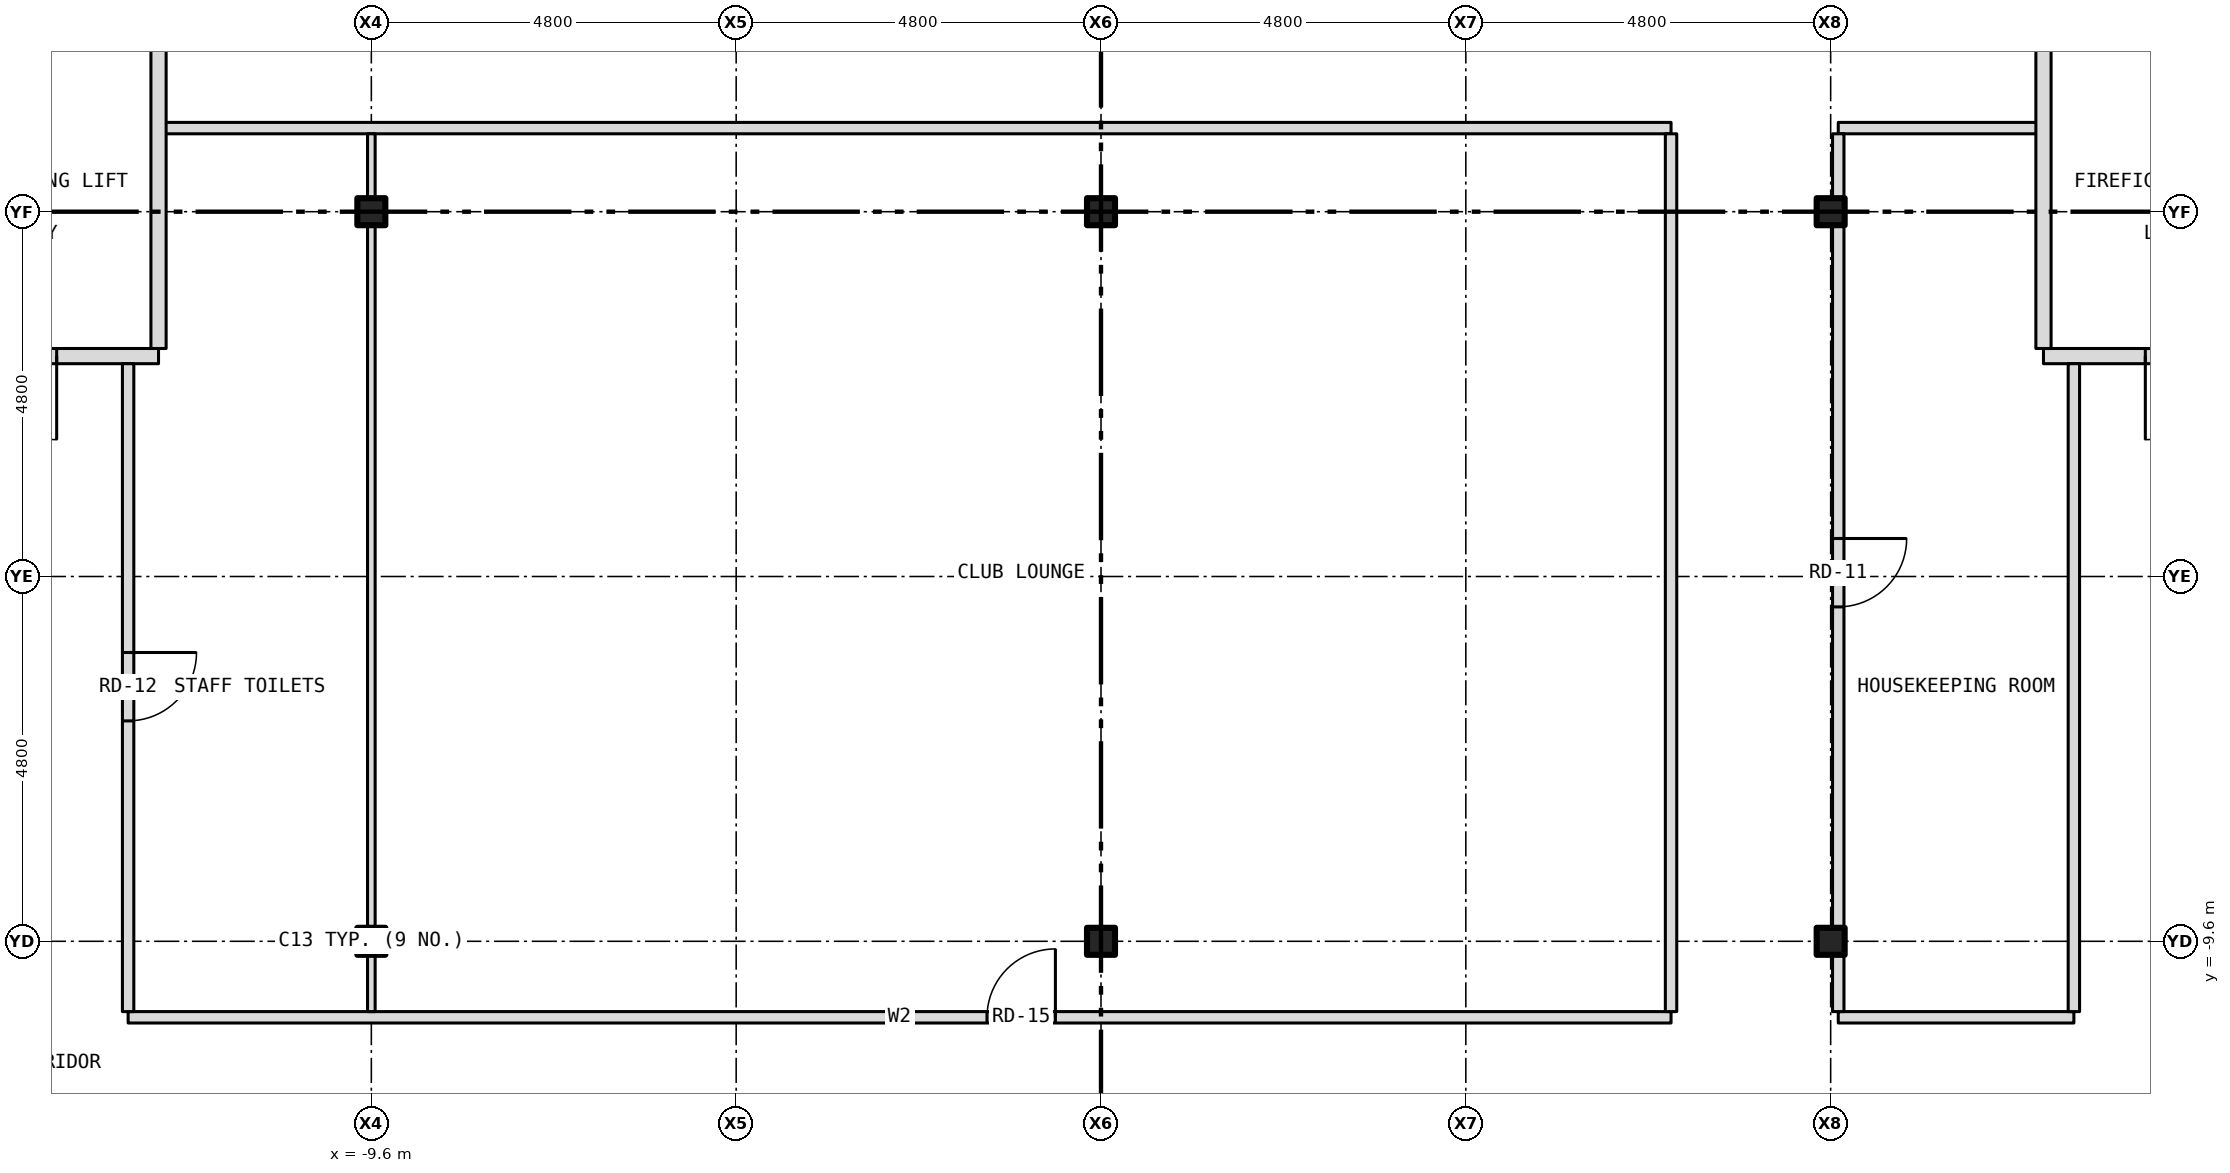
"""IFC4 building model, lengths in metres.
Left out: names, types, materials, properties, quantities, classifications, styles, units other than length and angle.
Written with IfcOpenShell. Run it as: python <this file> out.ifc"""

import sys

from ifc_helpers import new_model, si_unit, direction, frame, frame_2d, origin, origin_2d, place, context, subcontext, project, spatial, rectangle, i_section, extrude, element, fill, save


model = new_model("IFC4")
c1 = context("Model", 3, precision=1e-05, world=origin(), true_north=direction((0.0, 1.0)))
c2 = subcontext(c1, "Body", "Model", "MODEL_VIEW")
j1 = project(units=[si_unit("LENGTHUNIT", "METRE"), si_unit("PLANEANGLEUNIT", "RADIAN")], contexts=[c1])
p1 = place(None, origin())
s1 = spatial("IfcSite", under=j1, at=p1, CompositionType="ELEMENT")
p2 = place(p1, origin())
s2 = spatial("IfcBuilding", under=s1, at=p2, CompositionType="ELEMENT")
p3 = place(p2, frame((0.0, 0.0, 248.0)))
s3 = spatial("IfcBuildingStorey", under=s2, at=p3, CompositionType="ELEMENT", Elevation=248.0)
for number, where, z_axis, x_axis in (
    (1, (-9.6, -9.6, -0.15), (0.0, 0.0, 1.0), (1.0, 0.0, 0.0)),
    (2, (-9.6, 0.0, -0.15), (0.0, 0.0, 1.0), (1.0, 0.0, 0.0)),
    (3, (0.0, -9.6, -0.15), (0.0, 0.0, 1.0), (1.0, 0.0, 0.0)),
    (4, (0.0, 0.0, -0.15), (0.0, 0.0, 1.0), (1.0, 0.0, 0.0)),
    (5, (9.6, -9.6, -0.15), (0.0, 0.0, 1.0), (1.0, 0.0, 0.0)),
    (6, (9.6, 0.0, -0.15), (0.0, 0.0, 1.0), (1.0, 0.0, 0.0)),
):
    element("IfcColumn", number, at=place(p3, frame(where, z_axis=z_axis, x_axis=x_axis)), inside=s3, PredefinedType="COLUMN", context=c2, shape_type="SweptSolid", body=[
        extrude(i_section(OverallWidth=0.368, OverallDepth=0.356, WebThickness=0.011, FlangeThickness=0.018, at=origin_2d()), origin(), (0.0, 0.0, 1.0), 3.5),
    ])
p4 = place(p3, frame((-12.8, -10.6, 0.0), z_axis=(0.0, 0.0, 1.0), x_axis=(1.0, 0.0, 0.0)))
e7 = element("IfcWall", 7, at=p4, inside=s3, PredefinedType="PARTITIONING", context=c2, shape_type="SweptSolid", body=[
    extrude(rectangle(XDim=20.3, YDim=0.15, at=frame_2d((10.15, 0.0))), origin(), (0.0, 0.0, 1.0), 3.35),
])
p5 = place(p4, frame((11.3, 0.0, 0.0)))
e8 = element("IfcOpeningElement", 8, at=p5, cuts=e7, PredefinedType="OPENING", context=c2, shape_type="SweptSolid", body=[
    extrude(rectangle(XDim=0.9, YDim=2.1, at=frame_2d((0.45, 1.05))), frame((0.0, 0.087, 0.0), z_axis=(0.0, -1.0, 0.0), x_axis=(1.0, 0.0, 0.0)), (0.0, 0.0, 1.0), 0.174),
])
p6 = place(p3, frame((9.7, -10.6, 0.0), z_axis=(0.0, 0.0, 1.0), x_axis=(1.0, 0.0, 0.0)))
e9 = element("IfcWall", 9, at=p6, inside=s3, PredefinedType="PARTITIONING", context=c2, shape_type="SweptSolid", body=[
    extrude(rectangle(XDim=3.1, YDim=0.15, at=frame_2d((1.55, 0.0))), origin(), (0.0, 0.0, 1.0), 3.35),
])
p7 = place(p3, frame((-15.68, -1.9, 0.0), z_axis=(0.0, 0.0, 1.0), x_axis=(1.0, 0.0, 0.0)))
e10 = element("IfcWall", 10, at=p7, inside=s3, PredefinedType="PARTITIONING", context=c2, shape_type="SweptSolid", body=[
    extrude(rectangle(XDim=3.28, YDim=0.2, at=frame_2d((1.64, 0.0))), origin(), (0.0, 0.0, 1.0), 3.35),
])
p8 = place(p7, frame((0.84, 0.0, 0.0)))
e11 = element("IfcOpeningElement", 11, at=p8, cuts=e10, PredefinedType="OPENING", context=c2, shape_type="SweptSolid", body=[
    extrude(rectangle(XDim=1.1, YDim=2.1, at=frame_2d((0.55, 1.05))), frame((0.0, 0.112, 0.0), z_axis=(0.0, -1.0, 0.0), x_axis=(1.0, 0.0, 0.0)), (0.0, 0.0, 1.0), 0.224),
])
p9 = place(p3, frame((12.4, -1.9, 0.0), z_axis=(0.0, 0.0, 1.0), x_axis=(1.0, 0.0, 0.0)))
e12 = element("IfcWall", 12, at=p9, inside=s3, PredefinedType="PARTITIONING", context=c2, shape_type="SweptSolid", body=[
    extrude(rectangle(XDim=3.28, YDim=0.2, at=frame_2d((1.64, 0.0))), origin(), (0.0, 0.0, 1.0), 3.35),
])
p10 = place(p9, frame((1.34, 0.0, 0.0)))
e13 = element("IfcOpeningElement", 13, at=p10, cuts=e12, PredefinedType="OPENING", context=c2, shape_type="SweptSolid", body=[
    extrude(rectangle(XDim=1.1, YDim=2.1, at=frame_2d((0.55, 1.05))), frame((0.0, 0.112, 0.0), z_axis=(0.0, -1.0, 0.0), x_axis=(1.0, 0.0, 0.0)), (0.0, 0.0, 1.0), 0.224),
])
p11 = place(p3, frame((-12.4, 1.1, 0.0), z_axis=(0.0, 0.0, 1.0), x_axis=(1.0, 0.0, 0.0)))
e14 = element("IfcWall", 14, at=p11, inside=s3, PredefinedType="PARTITIONING", context=c2, shape_type="SweptSolid", body=[
    extrude(rectangle(XDim=19.9, YDim=0.15, at=frame_2d((9.95, 0.0))), origin(), (0.0, 0.0, 1.0), 3.35),
])
p12 = place(p3, frame((9.7, 1.1, 0.0), z_axis=(0.0, 0.0, 1.0), x_axis=(1.0, 0.0, 0.0)))
e15 = element("IfcWall", 15, at=p12, inside=s3, PredefinedType="PARTITIONING", context=c2, shape_type="SweptSolid", body=[
    extrude(rectangle(XDim=2.7, YDim=0.15, at=frame_2d((1.35, 0.0))), origin(), (0.0, 0.0, 1.0), 3.35),
])
p13 = place(p3, frame((-12.8, -10.525, 0.0), z_axis=(0.0, 0.0, 1.0), x_axis=(0.0, 1.0, 0.0)))
e16 = element("IfcWall", 16, at=p13, inside=s3, PredefinedType="PARTITIONING", context=c2, shape_type="SweptSolid", body=[
    extrude(rectangle(XDim=8.525, YDim=0.15, at=frame_2d((4.262, 0.0))), origin(), (0.0, 0.0, 1.0), 3.35),
])
p14 = place(p13, frame((3.825, 0.0, 0.0)))
e17 = element("IfcOpeningElement", 17, at=p14, cuts=e16, PredefinedType="OPENING", context=c2, shape_type="SweptSolid", body=[
    extrude(rectangle(XDim=0.9, YDim=2.1, at=frame_2d((0.45, 1.05))), frame((0.0, 0.087, 0.0), z_axis=(0.0, -1.0, 0.0), x_axis=(1.0, 0.0, 0.0)), (0.0, 0.0, 1.0), 0.174),
])
p15 = place(p3, frame((-12.4, -1.8, 0.0), z_axis=(0.0, 0.0, 1.0), x_axis=(0.0, 1.0, 0.0)))
e18 = element("IfcWall", 18, at=p15, inside=s3, PredefinedType="PARTITIONING", context=c2, shape_type="SweptSolid", body=[
    extrude(rectangle(XDim=4.0, YDim=0.2, at=frame_2d((2.0, 0.0))), origin(), (0.0, 0.0, 1.0), 3.35),
])
p16 = place(p3, frame((-9.6, -10.525, 0.0), z_axis=(0.0, 0.0, 1.0), x_axis=(0.0, 1.0, 0.0)))
e19 = element("IfcWall", 19, at=p16, inside=s3, PredefinedType="PARTITIONING", context=c2, shape_type="SweptSolid", body=[
    extrude(rectangle(XDim=0.741, YDim=0.1, at=frame_2d((0.371, 0.0))), origin(), (0.0, 0.0, 1.0), 2.728),
])
p17 = place(p3, frame((-9.6, -9.784, 0.0), z_axis=(0.0, 0.0, 1.0), x_axis=(0.0, 1.0, 0.0)))
e20 = element("IfcWall", 20, at=p17, inside=s3, PredefinedType="PARTITIONING", context=c2, shape_type="SweptSolid", body=[
    extrude(rectangle(XDim=0.368, YDim=0.1, at=frame_2d((0.184, 0.0))), origin(), (0.0, 0.0, 1.0), 3.35),
])
p18 = place(p3, frame((-9.6, -9.416, 0.0), z_axis=(0.0, 0.0, 1.0), x_axis=(0.0, 1.0, 0.0)))
e21 = element("IfcWall", 21, at=p18, inside=s3, PredefinedType="PARTITIONING", context=c2, shape_type="SweptSolid", body=[
    extrude(rectangle(XDim=9.232, YDim=0.1, at=frame_2d((4.616, 0.0))), origin(), (0.0, 0.0, 1.0), 2.728),
])
p19 = place(p3, frame((-9.6, -0.184, 0.0), z_axis=(0.0, 0.0, 1.0), x_axis=(0.0, 1.0, 0.0)))
e22 = element("IfcWall", 22, at=p19, inside=s3, PredefinedType="PARTITIONING", context=c2, shape_type="SweptSolid", body=[
    extrude(rectangle(XDim=0.368, YDim=0.1, at=frame_2d((0.184, 0.0))), origin(), (0.0, 0.0, 1.0), 3.35),
])
p20 = place(p3, frame((-9.6, 0.184, 0.0), z_axis=(0.0, 0.0, 1.0), x_axis=(0.0, 1.0, 0.0)))
e23 = element("IfcWall", 23, at=p20, inside=s3, PredefinedType="PARTITIONING", context=c2, shape_type="SweptSolid", body=[
    extrude(rectangle(XDim=0.841, YDim=0.1, at=frame_2d((0.42, 0.0))), origin(), (0.0, 0.0, 1.0), 2.728),
])
p21 = place(p3, frame((7.5, -10.525, 0.0), z_axis=(0.0, 0.0, 1.0), x_axis=(0.0, 1.0, 0.0)))
e24 = element("IfcWall", 24, at=p21, inside=s3, PredefinedType="PARTITIONING", context=c2, shape_type="SweptSolid", body=[
    extrude(rectangle(XDim=11.55, YDim=0.15, at=frame_2d((5.775, 0.0))), origin(), (0.0, 0.0, 1.0), 3.35),
])
p22 = place(p3, frame((9.7, -10.525, 0.0), z_axis=(0.0, 0.0, 1.0), x_axis=(0.0, 1.0, 0.0)))
e25 = element("IfcWall", 25, at=p22, inside=s3, PredefinedType="PARTITIONING", context=c2, shape_type="SweptSolid", body=[
    extrude(rectangle(XDim=0.741, YDim=0.15, at=frame_2d((0.371, 0.0))), origin(), (0.0, 0.0, 1.0), 2.728),
])
p23 = place(p3, frame((9.7, -9.784, 0.0), z_axis=(0.0, 0.0, 1.0), x_axis=(0.0, 1.0, 0.0)))
e26 = element("IfcWall", 26, at=p23, inside=s3, PredefinedType="PARTITIONING", context=c2, shape_type="SweptSolid", body=[
    extrude(rectangle(XDim=0.368, YDim=0.15, at=frame_2d((0.184, 0.0))), origin(), (0.0, 0.0, 1.0), 3.35),
])
p24 = place(p3, frame((9.7, -9.416, 0.0), z_axis=(0.0, 0.0, 1.0), x_axis=(0.0, 1.0, 0.0)))
e27 = element("IfcWall", 27, at=p24, inside=s3, PredefinedType="PARTITIONING", context=c2, shape_type="SweptSolid", body=[
    extrude(rectangle(XDim=9.232, YDim=0.15, at=frame_2d((4.616, 0.0))), origin(), (0.0, 0.0, 1.0), 2.728),
])
p25 = place(p24, frame((4.216, 0.0, 0.0)))
e28 = element("IfcOpeningElement", 28, at=p25, cuts=e27, PredefinedType="OPENING", context=c2, shape_type="SweptSolid", body=[
    extrude(rectangle(XDim=0.9, YDim=2.1, at=frame_2d((0.45, 1.05))), frame((0.0, 0.087, 0.0), z_axis=(0.0, -1.0, 0.0), x_axis=(1.0, 0.0, 0.0)), (0.0, 0.0, 1.0), 0.174),
])
p26 = place(p3, frame((9.7, -0.184, 0.0), z_axis=(0.0, 0.0, 1.0), x_axis=(0.0, 1.0, 0.0)))
e29 = element("IfcWall", 29, at=p26, inside=s3, PredefinedType="PARTITIONING", context=c2, shape_type="SweptSolid", body=[
    extrude(rectangle(XDim=0.368, YDim=0.15, at=frame_2d((0.184, 0.0))), origin(), (0.0, 0.0, 1.0), 3.35),
])
p27 = place(p3, frame((9.7, 0.184, 0.0), z_axis=(0.0, 0.0, 1.0), x_axis=(0.0, 1.0, 0.0)))
e30 = element("IfcWall", 30, at=p27, inside=s3, PredefinedType="PARTITIONING", context=c2, shape_type="SweptSolid", body=[
    extrude(rectangle(XDim=0.841, YDim=0.15, at=frame_2d((0.42, 0.0))), origin(), (0.0, 0.0, 1.0), 2.728),
])
p28 = place(p3, frame((12.4, -1.8, 0.0), z_axis=(0.0, 0.0, 1.0), x_axis=(0.0, 1.0, 0.0)))
e31 = element("IfcWall", 31, at=p28, inside=s3, PredefinedType="PARTITIONING", context=c2, shape_type="SweptSolid", body=[
    extrude(rectangle(XDim=4.0, YDim=0.2, at=frame_2d((2.0, 0.0))), origin(), (0.0, 0.0, 1.0), 3.35),
])
p29 = place(p3, frame((12.8, -10.525, 0.0), z_axis=(0.0, 0.0, 1.0), x_axis=(0.0, 1.0, 0.0)))
e32 = element("IfcWall", 32, at=p29, inside=s3, PredefinedType="PARTITIONING", context=c2, shape_type="SweptSolid", body=[
    extrude(rectangle(XDim=8.525, YDim=0.15, at=frame_2d((4.262, 0.0))), origin(), (0.0, 0.0, 1.0), 3.35),
])
p30 = place(p8, origin())
e33 = element("IfcDoor", 33, at=p30, inside=s3, OperationType="SINGLE_SWING_RIGHT", PredefinedType="DOOR", context=c2, shape_type="SweptSolid", body=[
    extrude(rectangle(XDim=1.1, YDim=2.1, at=frame_2d((0.55, 1.05))), frame((0.0, 0.025, 0.0), z_axis=(0.0, -1.0, 0.0), x_axis=(1.0, 0.0, 0.0)), (0.0, 0.0, 1.0), 0.05),
])
fill(e11, e33)
p31 = place(p10, origin())
e34 = element("IfcDoor", 34, at=p31, inside=s3, OperationType="SINGLE_SWING_LEFT", PredefinedType="DOOR", context=c2, shape_type="SweptSolid", body=[
    extrude(rectangle(XDim=1.1, YDim=2.1, at=frame_2d((0.55, 1.05))), frame((0.0, 0.025, 0.0), z_axis=(0.0, -1.0, 0.0), x_axis=(1.0, 0.0, 0.0)), (0.0, 0.0, 1.0), 0.05),
])
fill(e13, e34)
p32 = place(p25, origin())
e35 = element("IfcDoor", 35, at=p32, inside=s3, OperationType="SINGLE_SWING_RIGHT", PredefinedType="DOOR", context=c2, shape_type="SweptSolid", body=[
    extrude(rectangle(XDim=0.9, YDim=2.1, at=frame_2d((0.45, 1.05))), frame((0.0, 0.025, 0.0), z_axis=(0.0, -1.0, 0.0), x_axis=(1.0, 0.0, 0.0)), (0.0, 0.0, 1.0), 0.05),
])
fill(e28, e35)
p33 = place(p14, origin())
e36 = element("IfcDoor", 36, at=p33, inside=s3, OperationType="SINGLE_SWING_RIGHT", PredefinedType="DOOR", context=c2, shape_type="SweptSolid", body=[
    extrude(rectangle(XDim=0.9, YDim=2.1, at=frame_2d((0.45, 1.05))), frame((0.0, 0.025, 0.0), z_axis=(0.0, -1.0, 0.0), x_axis=(1.0, 0.0, 0.0)), (0.0, 0.0, 1.0), 0.05),
])
fill(e17, e36)
p34 = place(p5, origin())
e37 = element("IfcDoor", 37, at=p34, inside=s3, OperationType="SINGLE_SWING_RIGHT", PredefinedType="DOOR", context=c2, shape_type="SweptSolid", body=[
    extrude(rectangle(XDim=0.9, YDim=2.1, at=frame_2d((0.45, 1.05))), frame((0.0, 0.025, 0.0), z_axis=(0.0, -1.0, 0.0), x_axis=(1.0, 0.0, 0.0)), (0.0, 0.0, 1.0), 0.05),
])
fill(e8, e37)
save(model, sys.argv[1])
